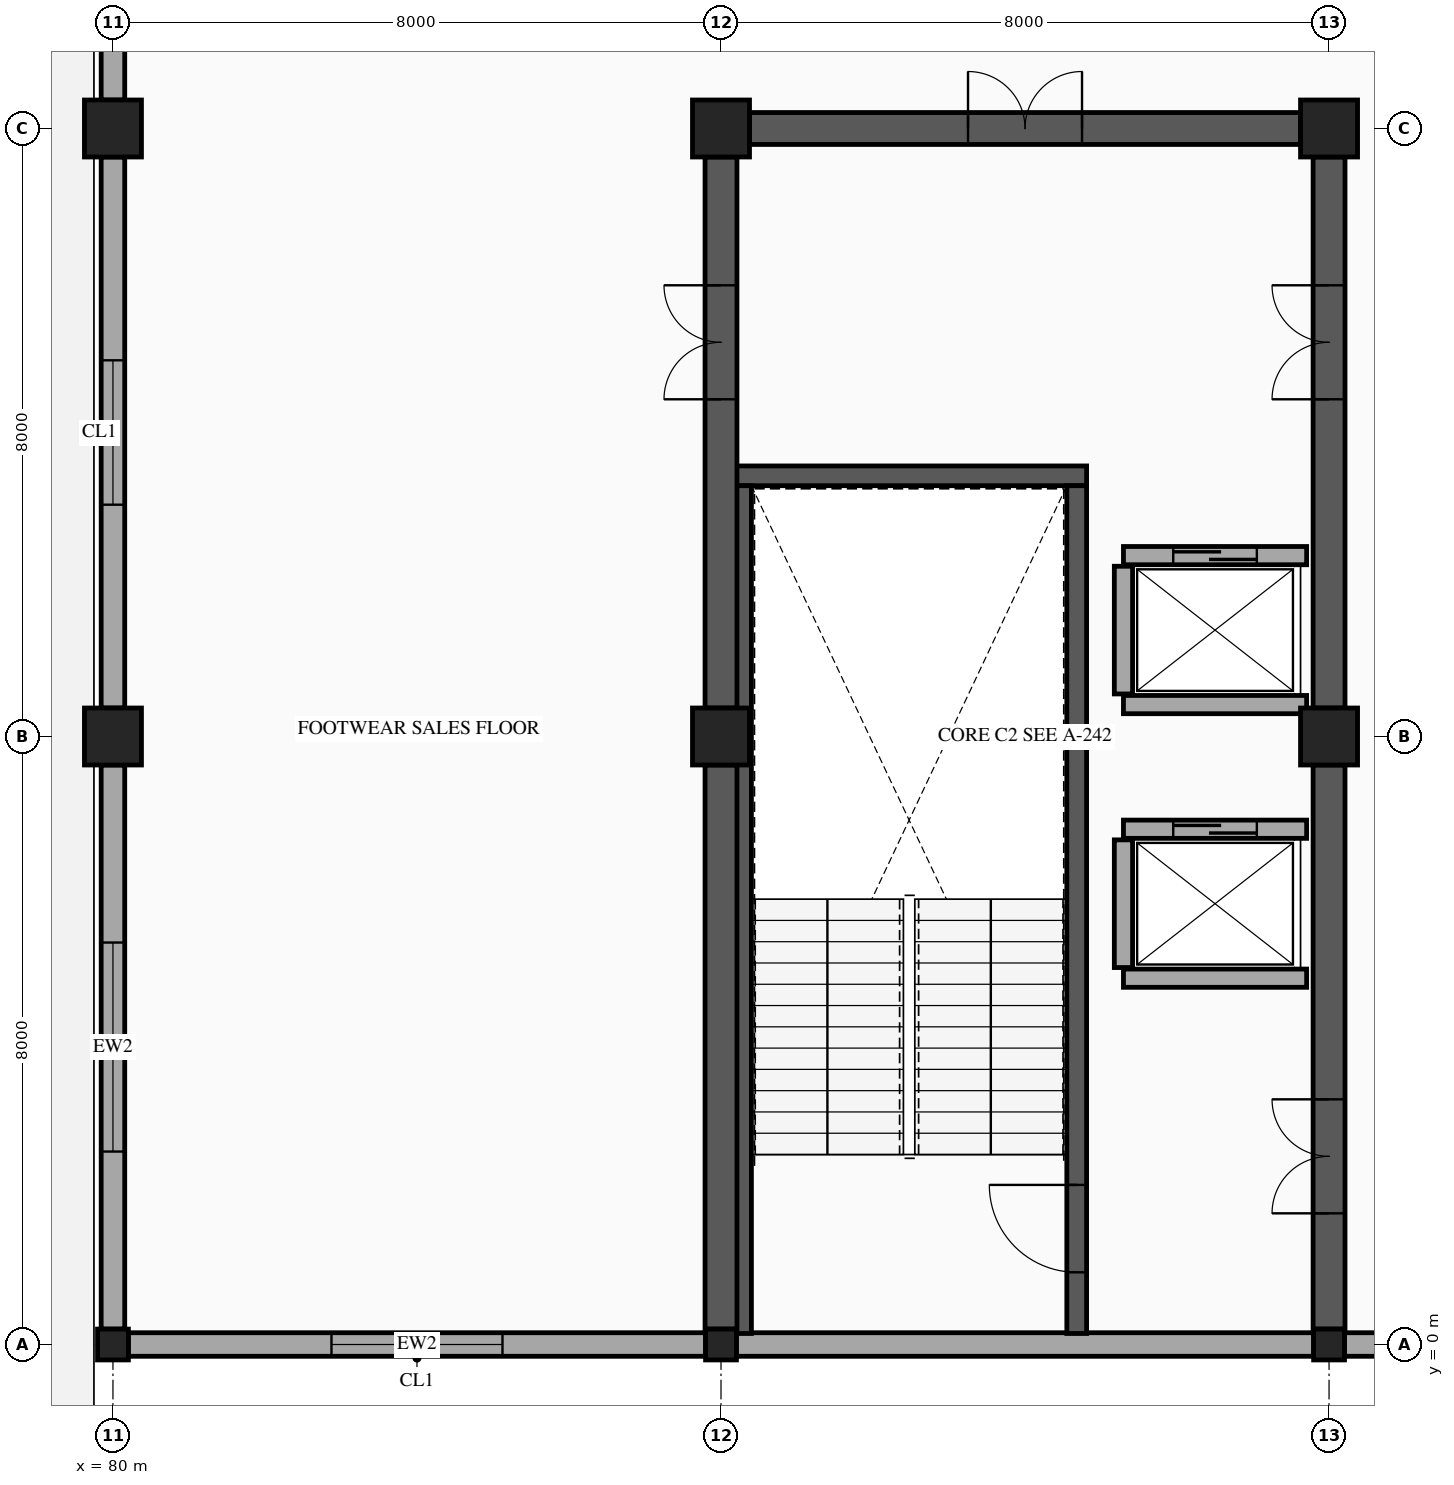
"""IFC4 building model, lengths in metres.
Left out: names, types, materials, properties, quantities, classifications, styles, units other than length and angle.
Written with IfcOpenShell. Run it as: python <this file> out.ifc"""

import sys

from ifc_helpers import new_model, si_unit, direction, frame, frame_2d, origin, origin_2d, place, context, subcontext, project, spatial, rectangle, hollow_rectangle, extrude, element, fill, save


model = new_model("IFC4")
c1 = context("Model", 3, precision=1e-05, world=origin(), true_north=direction((0.0, 1.0)))
c2 = subcontext(c1, "Body", "Model", "MODEL_VIEW")
j1 = project(units=[si_unit("LENGTHUNIT", "METRE"), si_unit("PLANEANGLEUNIT", "RADIAN")], contexts=[c1])
p1 = place(None, origin())
s1 = spatial("IfcSite", under=j1, at=p1, CompositionType="ELEMENT")
p2 = place(p1, origin())
s2 = spatial("IfcBuilding", under=s1, at=p2, CompositionType="ELEMENT")
p3 = place(p2, frame((0.0, 0.0, 10.4)))
s3 = spatial("IfcBuildingStorey", under=s2, at=p3, CompositionType="ELEMENT", Elevation=10.4)
p4 = place(p3, frame((80.0, 0.0, 0.0), z_axis=(0.0, 0.0, 1.0), x_axis=(1.0, 0.0, 0.0)))
e1 = element("IfcColumn", 1, at=p4, inside=s3, PredefinedType="COLUMN", context=c2, shape_type="SweptSolid", body=[
    extrude(hollow_rectangle(XDim=0.406, YDim=0.406, WallThickness=0.015, InnerFilletRadius=0.015, OuterFilletRadius=0.029, at=origin_2d()), origin(), (0.0, 0.0, 1.0), 4.5),
])
for number, where, z_axis, x_axis in (
    (2, (80.0, 8.0, 0.0), (0.0, 0.0, 1.0), (1.0, 0.0, 0.0)),
    (3, (80.0, 16.0, 0.0), (0.0, 0.0, 1.0), (1.0, 0.0, 0.0)),
):
    element("IfcColumn", number, at=place(p3, frame(where, z_axis=z_axis, x_axis=x_axis)), inside=s3, PredefinedType="COLUMN", context=c2, shape_type="SweptSolid", body=[
        extrude(rectangle(XDim=0.75, YDim=0.75, at=origin_2d()), origin(), (0.0, 0.0, 1.0), 4.5),
    ])
p5 = place(p3, frame((88.0, 0.0, 0.0), z_axis=(0.0, 0.0, 1.0), x_axis=(1.0, 0.0, 0.0)))
e4 = element("IfcColumn", 4, at=p5, inside=s3, PredefinedType="COLUMN", context=c2, shape_type="SweptSolid", body=[
    extrude(hollow_rectangle(XDim=0.406, YDim=0.406, WallThickness=0.015, InnerFilletRadius=0.015, OuterFilletRadius=0.029, at=origin_2d()), origin(), (0.0, 0.0, 1.0), 4.5),
])
for number, where, z_axis, x_axis in (
    (5, (88.0, 8.0, 0.0), (0.0, 0.0, 1.0), (1.0, 0.0, 0.0)),
    (6, (88.0, 16.0, 0.0), (0.0, 0.0, 1.0), (1.0, 0.0, 0.0)),
):
    element("IfcColumn", number, at=place(p3, frame(where, z_axis=z_axis, x_axis=x_axis)), inside=s3, PredefinedType="COLUMN", context=c2, shape_type="SweptSolid", body=[
        extrude(rectangle(XDim=0.75, YDim=0.75, at=origin_2d()), origin(), (0.0, 0.0, 1.0), 4.5),
    ])
p6 = place(p3, frame((96.0, 0.0, 0.0), z_axis=(0.0, 0.0, 1.0), x_axis=(1.0, 0.0, 0.0)))
e7 = element("IfcColumn", 7, at=p6, inside=s3, PredefinedType="COLUMN", context=c2, shape_type="SweptSolid", body=[
    extrude(hollow_rectangle(XDim=0.406, YDim=0.406, WallThickness=0.015, InnerFilletRadius=0.015, OuterFilletRadius=0.029, at=origin_2d()), origin(), (0.0, 0.0, 1.0), 4.5),
])
for number, where, z_axis, x_axis in (
    (8, (96.0, 8.0, 0.0), (0.0, 0.0, 1.0), (1.0, 0.0, 0.0)),
    (9, (96.0, 16.0, 0.0), (0.0, 0.0, 1.0), (1.0, 0.0, 0.0)),
):
    element("IfcColumn", number, at=place(p3, frame(where, z_axis=z_axis, x_axis=x_axis)), inside=s3, PredefinedType="COLUMN", context=c2, shape_type="SweptSolid", body=[
        extrude(rectangle(XDim=0.75, YDim=0.75, at=origin_2d()), origin(), (0.0, 0.0, 1.0), 4.5),
    ])
p7 = place(p3, frame((103.797, 0.0, 0.0), z_axis=(0.0, 0.0, 1.0), x_axis=(-1.0, 0.0, 0.0)))
e10 = element("IfcWall", 10, at=p7, inside=s3, PredefinedType="STANDARD", context=c2, shape_type="SweptSolid", body=[
    extrude(rectangle(XDim=7.594, YDim=0.31, at=frame_2d((3.797, 0.0))), origin(), (0.0, 0.0, 1.0), 3.48),
])
p8 = place(p7, frame((2.672, 0.0, 0.8)))
e11 = element("IfcOpeningElement", 11, at=p8, cuts=e10, PredefinedType="OPENING", context=c2, shape_type="SweptSolid", body=[
    extrude(rectangle(XDim=2.25, YDim=1.75, at=frame_2d((1.125, 0.875))), frame((0.0, 0.165, 0.0), z_axis=(0.0, -1.0, 0.0), x_axis=(1.0, 0.0, 0.0)), (0.0, 0.0, 1.0), 0.33),
])
p9 = place(p3, frame((95.797, 0.0, 0.0), z_axis=(0.0, 0.0, 1.0), x_axis=(-1.0, 0.0, 0.0)))
e12 = element("IfcWall", 12, at=p9, inside=s3, PredefinedType="STANDARD", context=c2, shape_type="SweptSolid", body=[
    extrude(rectangle(XDim=7.594, YDim=0.31, at=frame_2d((3.797, 0.0))), origin(), (0.0, 0.0, 1.0), 3.48),
])
p10 = place(p3, frame((87.797, 0.0, 0.0), z_axis=(0.0, 0.0, 1.0), x_axis=(-1.0, 0.0, 0.0)))
e13 = element("IfcWall", 13, at=p10, inside=s3, PredefinedType="STANDARD", context=c2, shape_type="SweptSolid", body=[
    extrude(rectangle(XDim=7.594, YDim=0.31, at=frame_2d((3.797, 0.0))), origin(), (0.0, 0.0, 1.0), 3.48),
])
p11 = place(p10, frame((2.672, 0.0, 0.8)))
e14 = element("IfcOpeningElement", 14, at=p11, cuts=e13, PredefinedType="OPENING", context=c2, shape_type="SweptSolid", body=[
    extrude(rectangle(XDim=2.25, YDim=1.75, at=frame_2d((1.125, 0.875))), frame((0.0, 0.165, 0.0), z_axis=(0.0, -1.0, 0.0), x_axis=(1.0, 0.0, 0.0)), (0.0, 0.0, 1.0), 0.33),
])
p12 = place(p3, frame((80.0, 0.203, 0.0), z_axis=(0.0, 0.0, 1.0), x_axis=(0.0, 1.0, 0.0)))
e15 = element("IfcWall", 15, at=p12, inside=s3, PredefinedType="STANDARD", context=c2, shape_type="SweptSolid", body=[
    extrude(rectangle(XDim=7.422, YDim=0.31, at=frame_2d((3.711, 0.0))), origin(), (0.0, 0.0, 1.0), 3.48),
])
p13 = place(p12, frame((2.336, 0.0, 0.8)))
e16 = element("IfcOpeningElement", 16, at=p13, cuts=e15, PredefinedType="OPENING", context=c2, shape_type="SweptSolid", body=[
    extrude(rectangle(XDim=2.75, YDim=2.15, at=frame_2d((1.375, 1.075))), frame((0.0, 0.165, 0.0), z_axis=(0.0, -1.0, 0.0), x_axis=(1.0, 0.0, 0.0)), (0.0, 0.0, 1.0), 0.33),
])
p14 = place(p3, frame((80.0, 8.375, 0.0), z_axis=(0.0, 0.0, 1.0), x_axis=(0.0, 1.0, 0.0)))
e17 = element("IfcWall", 17, at=p14, inside=s3, PredefinedType="STANDARD", context=c2, shape_type="SweptSolid", body=[
    extrude(rectangle(XDim=7.25, YDim=0.31, at=frame_2d((3.625, 0.0))), origin(), (0.0, 0.0, 1.0), 3.48),
])
p15 = place(p14, frame((2.675, 0.0, 0.8)))
e18 = element("IfcOpeningElement", 18, at=p15, cuts=e17, PredefinedType="OPENING", context=c2, shape_type="SweptSolid", body=[
    extrude(rectangle(XDim=1.9, YDim=1.65, at=frame_2d((0.95, 0.825))), frame((0.0, 0.165, 0.0), z_axis=(0.0, -1.0, 0.0), x_axis=(1.0, 0.0, 0.0)), (0.0, 0.0, 1.0), 0.33),
])
p16 = place(p3, frame((80.0, 16.375, 0.0), z_axis=(0.0, 0.0, 1.0), x_axis=(0.0, 1.0, 0.0)))
e19 = element("IfcWall", 19, at=p16, inside=s3, PredefinedType="STANDARD", context=c2, shape_type="SweptSolid", body=[
    extrude(rectangle(XDim=7.3, YDim=0.31, at=frame_2d((3.65, 0.0))), origin(), (0.0, 0.0, 1.0), 3.48),
])
p17 = place(p3, frame((88.14, 11.43, 0.0), z_axis=(0.0, 0.0, 1.0), x_axis=(1.0, 0.0, 0.0)))
e20 = element("IfcWall", 20, at=p17, inside=s3, PredefinedType="SHEAR", context=c2, shape_type="SweptSolid", body=[
    extrude(rectangle(XDim=4.67, YDim=0.26, at=frame_2d((2.335, 0.0))), origin(), (0.0, 0.0, 1.0), 4.28),
])
p18 = place(p3, frame((88.27, 0.145, 0.0), z_axis=(0.0, 0.0, 1.0), x_axis=(0.0, 1.0, 0.0)))
e21 = element("IfcWall", 21, at=p18, inside=s3, PredefinedType="SHEAR", context=c2, shape_type="SweptSolid", body=[
    extrude(rectangle(XDim=11.155, YDim=0.26, at=frame_2d((5.578, 0.0))), origin(), (0.0, 0.0, 1.0), 4.28),
])
p19 = place(p3, frame((92.68, 0.145, 0.0), z_axis=(0.0, 0.0, 1.0), x_axis=(0.0, 1.0, 0.0)))
e22 = element("IfcWall", 22, at=p19, inside=s3, PredefinedType="SHEAR", context=c2, shape_type="SweptSolid", body=[
    extrude(rectangle(XDim=11.155, YDim=0.26, at=frame_2d((5.578, 0.0))), origin(), (0.0, 0.0, 1.0), 4.28),
])
p20 = place(p19, frame((0.805, 0.0, 0.0)))
e23 = element("IfcOpeningElement", 23, at=p20, cuts=e22, PredefinedType="OPENING", context=c2, shape_type="SweptSolid", body=[
    extrude(rectangle(XDim=1.15, YDim=2.15, at=frame_2d((0.575, 1.075))), frame((0.0, 0.14, 0.0), z_axis=(0.0, -1.0, 0.0), x_axis=(1.0, 0.0, 0.0)), (0.0, 0.0, 1.0), 0.28),
])
p21 = place(p3, frame((88.375, 16.0, 0.0), z_axis=(0.0, 0.0, 1.0), x_axis=(1.0, 0.0, 0.0)))
e24 = element("IfcWall", 24, at=p21, inside=s3, PredefinedType="SHEAR", context=c2, shape_type="SweptSolid", body=[
    extrude(rectangle(XDim=7.25, YDim=0.42, at=frame_2d((3.625, 0.0))), origin(), (0.0, 0.0, 1.0), 4.28),
])
p22 = place(p21, frame((2.875, 0.0, 0.0)))
e25 = element("IfcOpeningElement", 25, at=p22, cuts=e24, PredefinedType="OPENING", context=c2, shape_type="SweptSolid", body=[
    extrude(rectangle(XDim=1.5, YDim=2.15, at=frame_2d((0.75, 1.075))), frame((0.0, 0.22, 0.0), z_axis=(0.0, -1.0, 0.0), x_axis=(1.0, 0.0, 0.0)), (0.0, 0.0, 1.0), 0.44),
])
p23 = place(p3, frame((88.0, 0.203, 0.0), z_axis=(0.0, 0.0, 1.0), x_axis=(0.0, 1.0, 0.0)))
e26 = element("IfcWall", 26, at=p23, inside=s3, PredefinedType="SHEAR", context=c2, shape_type="SweptSolid", body=[
    extrude(rectangle(XDim=7.422, YDim=0.42, at=frame_2d((3.711, 0.0))), origin(), (0.0, 0.0, 1.0), 4.28),
])
p24 = place(p3, frame((88.0, 8.375, 0.0), z_axis=(0.0, 0.0, 1.0), x_axis=(0.0, 1.0, 0.0)))
e27 = element("IfcWall", 27, at=p24, inside=s3, PredefinedType="SHEAR", context=c2, shape_type="SweptSolid", body=[
    extrude(rectangle(XDim=7.25, YDim=0.42, at=frame_2d((3.625, 0.0))), origin(), (0.0, 0.0, 1.0), 4.28),
])
p25 = place(p24, frame((4.062, 0.0, 0.0)))
e28 = element("IfcOpeningElement", 28, at=p25, cuts=e27, PredefinedType="OPENING", context=c2, shape_type="SweptSolid", body=[
    extrude(rectangle(XDim=1.5, YDim=2.15, at=frame_2d((0.75, 1.075))), frame((0.0, 0.22, 0.0), z_axis=(0.0, -1.0, 0.0), x_axis=(1.0, 0.0, 0.0)), (0.0, 0.0, 1.0), 0.44),
])
p26 = place(p3, frame((96.0, 0.203, 0.0), z_axis=(0.0, 0.0, 1.0), x_axis=(0.0, 1.0, 0.0)))
e29 = element("IfcWall", 29, at=p26, inside=s3, PredefinedType="SHEAR", context=c2, shape_type="SweptSolid", body=[
    extrude(rectangle(XDim=7.422, YDim=0.42, at=frame_2d((3.711, 0.0))), origin(), (0.0, 0.0, 1.0), 4.28),
])
p27 = place(p26, frame((1.523, 0.0, 0.0)))
e30 = element("IfcOpeningElement", 30, at=p27, cuts=e29, PredefinedType="OPENING", context=c2, shape_type="SweptSolid", body=[
    extrude(rectangle(XDim=1.5, YDim=2.15, at=frame_2d((0.75, 1.075))), frame((0.0, 0.22, 0.0), z_axis=(0.0, -1.0, 0.0), x_axis=(1.0, 0.0, 0.0)), (0.0, 0.0, 1.0), 0.44),
])
p28 = place(p3, frame((96.0, 8.375, 0.0), z_axis=(0.0, 0.0, 1.0), x_axis=(0.0, 1.0, 0.0)))
e31 = element("IfcWall", 31, at=p28, inside=s3, PredefinedType="SHEAR", context=c2, shape_type="SweptSolid", body=[
    extrude(rectangle(XDim=7.25, YDim=0.42, at=frame_2d((3.625, 0.0))), origin(), (0.0, 0.0, 1.0), 4.28),
])
p29 = place(p28, frame((4.062, 0.0, 0.0)))
e32 = element("IfcOpeningElement", 32, at=p29, cuts=e31, PredefinedType="OPENING", context=c2, shape_type="SweptSolid", body=[
    extrude(rectangle(XDim=1.5, YDim=2.15, at=frame_2d((0.75, 1.075))), frame((0.0, 0.22, 0.0), z_axis=(0.0, -1.0, 0.0), x_axis=(1.0, 0.0, 0.0)), (0.0, 0.0, 1.0), 0.44),
])
p30 = place(p3, frame((93.295, 6.78, 0.0), z_axis=(0.0, 0.0, 1.0), x_axis=(1.0, 0.0, 0.0)))
e33 = element("IfcWall", 33, at=p30, inside=s3, PredefinedType="PARTITIONING", context=c2, shape_type="SweptSolid", body=[
    extrude(rectangle(XDim=2.41, YDim=0.24, at=frame_2d((1.205, 0.0))), origin(), (0.0, 0.0, 1.0), 4.28),
])
p31 = place(p30, frame((0.655, 0.0, 0.0)))
e34 = element("IfcOpeningElement", 34, at=p31, cuts=e33, PredefinedType="OPENING", context=c2, shape_type="SweptSolid", body=[
    extrude(rectangle(XDim=1.1, YDim=2.15, at=frame_2d((0.55, 1.075))), frame((0.0, 0.13, 0.0), z_axis=(0.0, -1.0, 0.0), x_axis=(1.0, 0.0, 0.0)), (0.0, 0.0, 1.0), 0.26),
])
p32 = place(p3, frame((93.295, 4.82, 0.0), z_axis=(0.0, 0.0, 1.0), x_axis=(1.0, 0.0, 0.0)))
e35 = element("IfcWall", 35, at=p32, inside=s3, PredefinedType="PARTITIONING", context=c2, shape_type="SweptSolid", body=[
    extrude(rectangle(XDim=2.41, YDim=0.24, at=frame_2d((1.205, 0.0))), origin(), (0.0, 0.0, 1.0), 4.28),
])
p33 = place(p3, frame((93.295, 4.96, 0.0), z_axis=(0.0, 0.0, 1.0), x_axis=(0.0, 1.0, 0.0)))
e36 = element("IfcWall", 36, at=p33, inside=s3, PredefinedType="PARTITIONING", context=c2, shape_type="SweptSolid", body=[
    extrude(rectangle(XDim=1.68, YDim=0.24, at=frame_2d((0.84, 0.0))), origin(), (0.0, 0.0, 1.0), 4.28),
])
p34 = place(p3, frame((93.295, 10.38, 0.0), z_axis=(0.0, 0.0, 1.0), x_axis=(1.0, 0.0, 0.0)))
e37 = element("IfcWall", 37, at=p34, inside=s3, PredefinedType="PARTITIONING", context=c2, shape_type="SweptSolid", body=[
    extrude(rectangle(XDim=2.41, YDim=0.24, at=frame_2d((1.205, 0.0))), origin(), (0.0, 0.0, 1.0), 4.28),
])
p35 = place(p34, frame((0.655, 0.0, 0.0)))
e38 = element("IfcOpeningElement", 38, at=p35, cuts=e37, PredefinedType="OPENING", context=c2, shape_type="SweptSolid", body=[
    extrude(rectangle(XDim=1.1, YDim=2.15, at=frame_2d((0.55, 1.075))), frame((0.0, 0.13, 0.0), z_axis=(0.0, -1.0, 0.0), x_axis=(1.0, 0.0, 0.0)), (0.0, 0.0, 1.0), 0.26),
])
p36 = place(p3, frame((93.295, 8.42, 0.0), z_axis=(0.0, 0.0, 1.0), x_axis=(1.0, 0.0, 0.0)))
e39 = element("IfcWall", 39, at=p36, inside=s3, PredefinedType="PARTITIONING", context=c2, shape_type="SweptSolid", body=[
    extrude(rectangle(XDim=2.41, YDim=0.24, at=frame_2d((1.205, 0.0))), origin(), (0.0, 0.0, 1.0), 4.28),
])
p37 = place(p3, frame((93.295, 8.56, 0.0), z_axis=(0.0, 0.0, 1.0), x_axis=(0.0, 1.0, 0.0)))
e40 = element("IfcWall", 40, at=p37, inside=s3, PredefinedType="PARTITIONING", context=c2, shape_type="SweptSolid", body=[
    extrude(rectangle(XDim=1.68, YDim=0.24, at=frame_2d((0.84, 0.0))), origin(), (0.0, 0.0, 1.0), 4.28),
])
p38 = place(p11, origin())
e41 = element("IfcWindow", 41, at=p38, inside=s3, PartitioningType="DOUBLE_PANEL_VERTICAL", PredefinedType="WINDOW", context=c2, shape_type="SweptSolid", body=[
    extrude(rectangle(XDim=2.25, YDim=1.75, at=frame_2d((1.125, 0.875))), frame((0.0, 0.03, 0.0), z_axis=(0.0, -1.0, 0.0), x_axis=(1.0, 0.0, 0.0)), (0.0, 0.0, 1.0), 0.06),
])
fill(e14, e41)
p39 = place(p13, origin())
e42 = element("IfcWindow", 42, at=p39, inside=s3, PartitioningType="TRIPLE_PANEL_VERTICAL", PredefinedType="WINDOW", context=c2, shape_type="SweptSolid", body=[
    extrude(rectangle(XDim=2.75, YDim=2.15, at=frame_2d((1.375, 1.075))), frame((0.0, 0.03, 0.0), z_axis=(0.0, -1.0, 0.0), x_axis=(1.0, 0.0, 0.0)), (0.0, 0.0, 1.0), 0.06),
])
fill(e16, e42)
p40 = place(p15, origin())
e43 = element("IfcWindow", 43, at=p40, inside=s3, PartitioningType="DOUBLE_PANEL_VERTICAL", PredefinedType="WINDOW", context=c2, shape_type="SweptSolid", body=[
    extrude(rectangle(XDim=1.9, YDim=1.65, at=frame_2d((0.95, 0.825))), frame((0.0, 0.03, 0.0), z_axis=(0.0, -1.0, 0.0), x_axis=(1.0, 0.0, 0.0)), (0.0, 0.0, 1.0), 0.06),
])
fill(e18, e43)
p41 = place(p20, origin())
e44 = element("IfcDoor", 44, at=p41, inside=s3, OperationType="SINGLE_SWING_RIGHT", PredefinedType="DOOR", context=c2, shape_type="SweptSolid", body=[
    extrude(rectangle(XDim=1.15, YDim=2.15, at=frame_2d((0.575, 1.075))), frame((0.0, 0.025, 0.0), z_axis=(0.0, -1.0, 0.0), x_axis=(1.0, 0.0, 0.0)), (0.0, 0.0, 1.0), 0.05),
])
fill(e23, e44)
p42 = place(p22, origin())
e45 = element("IfcDoor", 45, at=p42, inside=s3, OperationType="DOUBLE_DOOR_SINGLE_SWING", PredefinedType="DOOR", context=c2, shape_type="SweptSolid", body=[
    extrude(rectangle(XDim=1.5, YDim=2.15, at=frame_2d((0.75, 1.075))), frame((0.0, 0.025, 0.0), z_axis=(0.0, -1.0, 0.0), x_axis=(1.0, 0.0, 0.0)), (0.0, 0.0, 1.0), 0.05),
])
fill(e25, e45)
p43 = place(p25, origin())
e46 = element("IfcDoor", 46, at=p43, inside=s3, OperationType="DOUBLE_DOOR_SINGLE_SWING", PredefinedType="DOOR", context=c2, shape_type="SweptSolid", body=[
    extrude(rectangle(XDim=1.5, YDim=2.15, at=frame_2d((0.75, 1.075))), frame((0.0, 0.025, 0.0), z_axis=(0.0, -1.0, 0.0), x_axis=(1.0, 0.0, 0.0)), (0.0, 0.0, 1.0), 0.05),
])
fill(e28, e46)
p44 = place(p27, origin())
e47 = element("IfcDoor", 47, at=p44, inside=s3, OperationType="DOUBLE_DOOR_SINGLE_SWING", PredefinedType="DOOR", context=c2, shape_type="SweptSolid", body=[
    extrude(rectangle(XDim=1.5, YDim=2.15, at=frame_2d((0.75, 1.075))), frame((0.0, 0.025, 0.0), z_axis=(0.0, -1.0, 0.0), x_axis=(1.0, 0.0, 0.0)), (0.0, 0.0, 1.0), 0.05),
])
fill(e30, e47)
p45 = place(p29, origin())
e48 = element("IfcDoor", 48, at=p45, inside=s3, OperationType="DOUBLE_DOOR_SINGLE_SWING", PredefinedType="DOOR", context=c2, shape_type="SweptSolid", body=[
    extrude(rectangle(XDim=1.5, YDim=2.15, at=frame_2d((0.75, 1.075))), frame((0.0, 0.025, 0.0), z_axis=(0.0, -1.0, 0.0), x_axis=(1.0, 0.0, 0.0)), (0.0, 0.0, 1.0), 0.05),
])
fill(e32, e48)
p46 = place(p31, origin())
e49 = element("IfcDoor", 49, at=p46, inside=s3, OperationType="SLIDING_TO_LEFT", PredefinedType="DOOR", context=c2, shape_type="SweptSolid", body=[
    extrude(rectangle(XDim=1.1, YDim=2.15, at=frame_2d((0.55, 1.075))), frame((0.0, 0.025, 0.0), z_axis=(0.0, -1.0, 0.0), x_axis=(1.0, 0.0, 0.0)), (0.0, 0.0, 1.0), 0.05),
])
fill(e34, e49)
p47 = place(p35, origin())
e50 = element("IfcDoor", 50, at=p47, inside=s3, OperationType="SLIDING_TO_LEFT", PredefinedType="DOOR", context=c2, shape_type="SweptSolid", body=[
    extrude(rectangle(XDim=1.1, YDim=2.15, at=frame_2d((0.55, 1.075))), frame((0.0, 0.025, 0.0), z_axis=(0.0, -1.0, 0.0), x_axis=(1.0, 0.0, 0.0)), (0.0, 0.0, 1.0), 0.05),
])
fill(e38, e50)
save(model, sys.argv[1])
